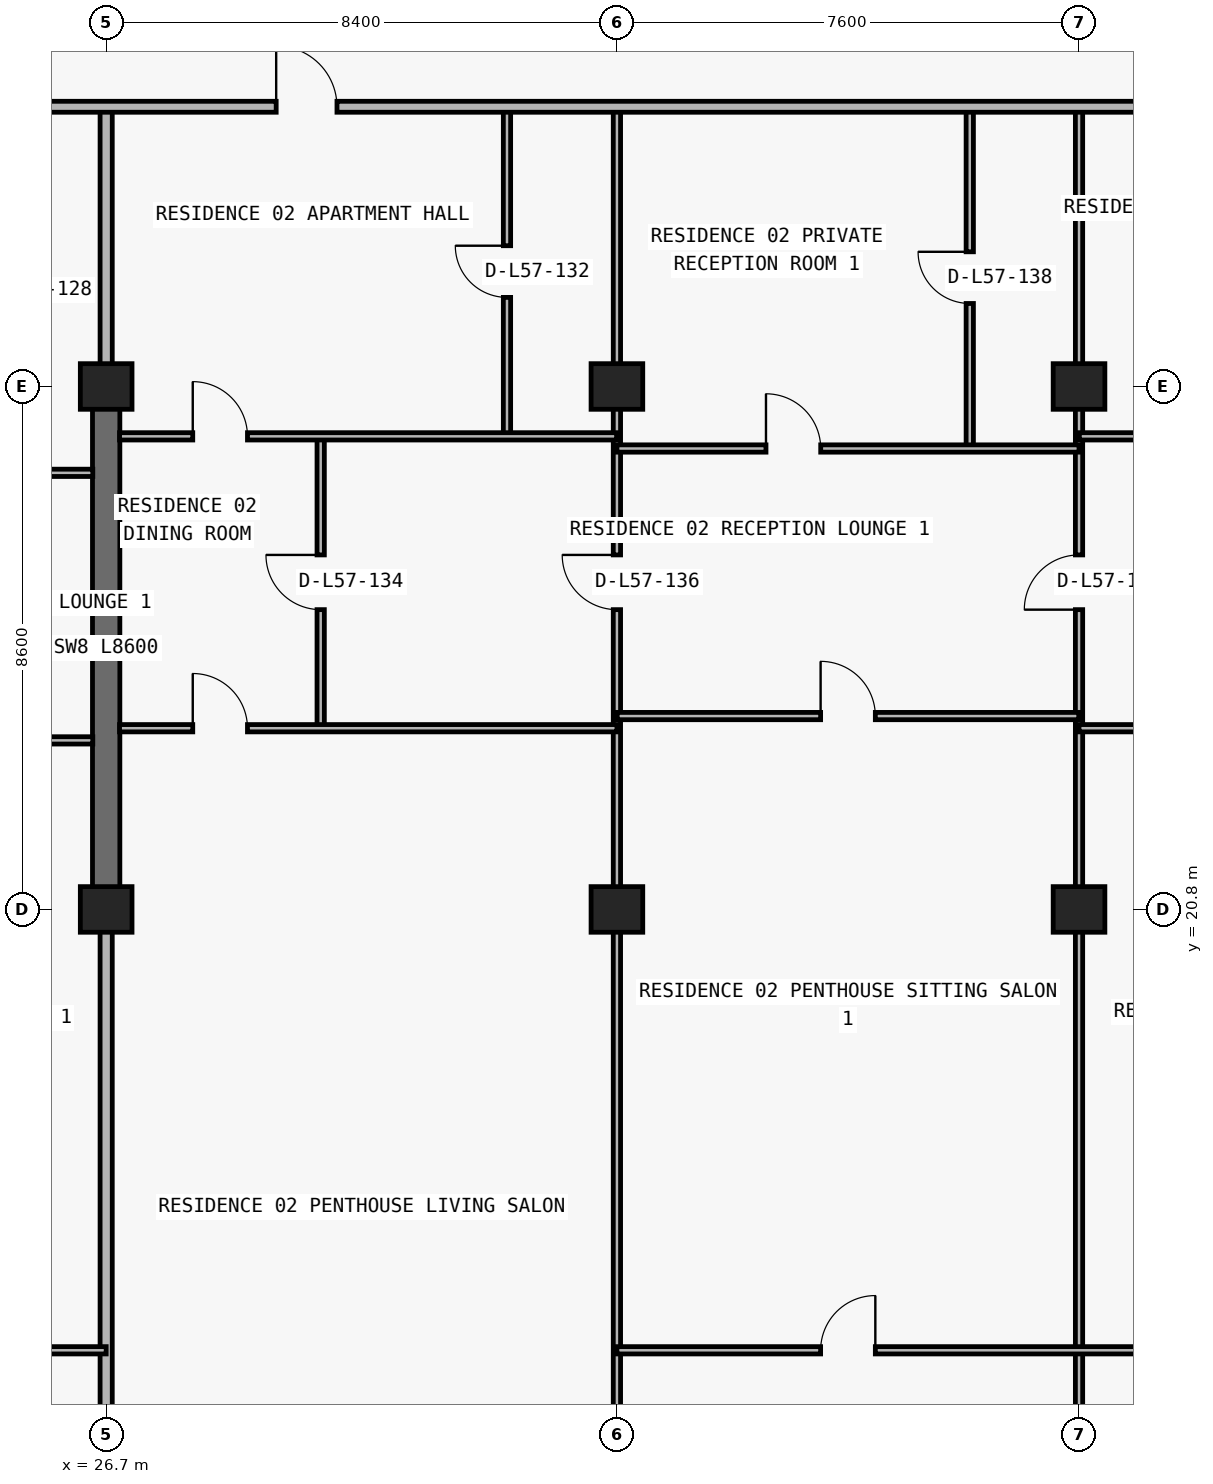
"""IFC4 building model, lengths in metres.
Left out: names, types, materials, properties, quantities, classifications, styles, units other than length and angle.
Written with IfcOpenShell. Run it as: python <this file> out.ifc"""

import sys

from ifc_helpers import new_model, si_unit, direction, frame, frame_2d, origin, origin_2d, place, context, subcontext, project, spatial, rectangle, extrude, element, fill, save


model = new_model("IFC4")
c1 = context("Model", 3, precision=1e-05, world=origin(), true_north=direction((0.0, 1.0)))
c2 = subcontext(c1, "Body", "Model", "MODEL_VIEW")
j1 = project(units=[si_unit("LENGTHUNIT", "METRE"), si_unit("PLANEANGLEUNIT", "RADIAN")], contexts=[c1])
p1 = place(None, origin())
s1 = spatial("IfcSite", under=j1, at=p1, CompositionType="ELEMENT")
p2 = place(p1, origin())
s2 = spatial("IfcBuilding", under=s1, at=p2, CompositionType="ELEMENT")
p3 = place(p2, frame((0.0, 0.0, 204.9)))
s3 = spatial("IfcBuildingStorey", under=s2, at=p3, CompositionType="ELEMENT", Elevation=204.9)
for number, where, z_axis, x_axis in (
    (1, (26.7, 20.8, 0.0), (0.0, 0.0, 1.0), (1.0, 0.0, 0.0)),
    (2, (35.1, 20.8, 0.0), (0.0, 0.0, 1.0), (1.0, 0.0, 0.0)),
    (3, (42.7, 20.8, 0.0), (0.0, 0.0, 1.0), (1.0, 0.0, 0.0)),
    (4, (26.7, 29.4, 0.0), (0.0, 0.0, 1.0), (1.0, 0.0, 0.0)),
    (5, (35.1, 29.4, 0.0), (0.0, 0.0, 1.0), (1.0, 0.0, 0.0)),
    (6, (42.7, 29.4, 0.0), (0.0, 0.0, 1.0), (1.0, 0.0, 0.0)),
):
    element("IfcColumn", number, at=place(p3, frame(where, z_axis=z_axis, x_axis=x_axis)), inside=s3, PredefinedType="COLUMN", context=c2, shape_type="SweptSolid", body=[
        extrude(rectangle(XDim=0.85, YDim=0.75, at=origin_2d()), origin(), (0.0, 0.0, 1.0), 3.05),
    ])
p4 = place(p3, frame((26.7, 20.8, 0.0), z_axis=(0.0, 0.0, 1.0), x_axis=(0.0, 1.0, 0.0)))
e7 = element("IfcWall", 7, at=p4, inside=s3, PredefinedType="SHEAR", context=c2, shape_type="SweptSolid", body=[
    extrude(rectangle(XDim=8.6, YDim=0.45, at=frame_2d((4.3, 0.0))), origin(), (0.0, 0.0, 1.0), 3.05),
])
p5 = place(p3, frame((26.7, 11.24, 0.0), z_axis=(0.0, 0.0, 1.0), x_axis=(0.0, 1.0, 0.0)))
e8 = element("IfcWall", 8, at=p5, inside=s3, PredefinedType="PARTITIONING", context=c2, shape_type="SweptSolid", body=[
    extrude(rectangle(XDim=9.555, YDim=0.2, at=frame_2d((4.777, 0.0))), origin(), (0.0, 0.0, 1.0), 2.263),
])
p6 = place(p3, frame((26.7, 29.405, 0.0), z_axis=(0.0, 0.0, 1.0), x_axis=(0.0, 1.0, 0.0)))
e9 = element("IfcWall", 9, at=p6, inside=s3, PredefinedType="PARTITIONING", context=c2, shape_type="SweptSolid", body=[
    extrude(rectangle(XDim=4.595, YDim=0.2, at=frame_2d((2.297, 0.0))), origin(), (0.0, 0.0, 1.0), 2.335),
])
p7 = place(p3, frame((30.228, 23.78, 0.0), z_axis=(0.0, 0.0, 1.0), x_axis=(0.0, 1.0, 0.0)))
e10 = element("IfcWall", 10, at=p7, inside=s3, PredefinedType="PARTITIONING", context=c2, shape_type="SweptSolid", body=[
    extrude(rectangle(XDim=4.8, YDim=0.12, at=frame_2d((2.4, 0.0))), origin(), (0.0, 0.0, 1.0), 3.05),
])
p8 = place(p7, frame((1.95, 0.0, 0.0)))
e11 = element("IfcOpeningElement", 11, at=p8, cuts=e10, PredefinedType="OPENING", context=c2, shape_type="SweptSolid", body=[
    extrude(rectangle(XDim=0.9, YDim=2.15, at=frame_2d((0.45, 1.075))), frame((0.0, 0.07, 0.0), z_axis=(0.0, -1.0, 0.0), x_axis=(1.0, 0.0, 0.0)), (0.0, 0.0, 1.0), 0.14),
])
p9 = place(p3, frame((33.292, 28.58, 0.0), z_axis=(0.0, 0.0, 1.0), x_axis=(0.0, 1.0, 0.0)))
e12 = element("IfcWall", 12, at=p9, inside=s3, PredefinedType="PARTITIONING", context=c2, shape_type="SweptSolid", body=[
    extrude(rectangle(XDim=5.42, YDim=0.12, at=frame_2d((2.71, 0.0))), origin(), (0.0, 0.0, 1.0), 2.725),
])
p10 = place(p9, frame((2.285, 0.0, 0.0)))
e13 = element("IfcOpeningElement", 13, at=p10, cuts=e12, PredefinedType="OPENING", context=c2, shape_type="SweptSolid", body=[
    extrude(rectangle(XDim=0.85, YDim=2.1, at=frame_2d((0.425, 1.05))), frame((0.0, 0.07, 0.0), z_axis=(0.0, -1.0, 0.0), x_axis=(1.0, 0.0, 0.0)), (0.0, 0.0, 1.0), 0.14),
])
p11 = place(p3, frame((35.1, 11.24, 0.0), z_axis=(0.0, 0.0, 1.0), x_axis=(0.0, 1.0, 0.0)))
e14 = element("IfcWall", 14, at=p11, inside=s3, PredefinedType="PARTITIONING", context=c2, shape_type="SweptSolid", body=[
    extrude(rectangle(XDim=22.76, YDim=0.12, at=frame_2d((11.38, 0.0))), origin(), (0.0, 0.0, 1.0), 2.263),
])
p12 = place(p11, frame((14.49, 0.0, 0.0)))
e15 = element("IfcOpeningElement", 15, at=p12, cuts=e14, PredefinedType="OPENING", context=c2, shape_type="SweptSolid", body=[
    extrude(rectangle(XDim=0.9, YDim=2.15, at=frame_2d((0.45, 1.075))), frame((0.0, 0.07, 0.0), z_axis=(0.0, -1.0, 0.0), x_axis=(1.0, 0.0, 0.0)), (0.0, 0.0, 1.0), 0.14),
])
p13 = place(p3, frame((40.903, 28.38, 0.0), z_axis=(0.0, 0.0, 1.0), x_axis=(0.0, 1.0, 0.0)))
e16 = element("IfcWall", 16, at=p13, inside=s3, PredefinedType="PARTITIONING", context=c2, shape_type="SweptSolid", body=[
    extrude(rectangle(XDim=5.62, YDim=0.12, at=frame_2d((2.81, 0.0))), origin(), (0.0, 0.0, 1.0), 2.725),
])
p14 = place(p13, frame((2.385, 0.0, 0.0)))
e17 = element("IfcOpeningElement", 17, at=p14, cuts=e16, PredefinedType="OPENING", context=c2, shape_type="SweptSolid", body=[
    extrude(rectangle(XDim=0.85, YDim=2.1, at=frame_2d((0.425, 1.05))), frame((0.0, 0.07, 0.0), z_axis=(0.0, -1.0, 0.0), x_axis=(1.0, 0.0, 0.0)), (0.0, 0.0, 1.0), 0.14),
])
p15 = place(p3, frame((42.7, 11.24, 0.0), z_axis=(0.0, 0.0, 1.0), x_axis=(0.0, 1.0, 0.0)))
e18 = element("IfcWall", 18, at=p15, inside=s3, PredefinedType="PARTITIONING", context=c2, shape_type="SweptSolid", body=[
    extrude(rectangle(XDim=22.76, YDim=0.12, at=frame_2d((11.38, 0.0))), origin(), (0.0, 0.0, 1.0), 2.263),
])
p16 = place(p15, frame((14.49, 0.0, 0.0)))
e19 = element("IfcOpeningElement", 19, at=p16, cuts=e18, PredefinedType="OPENING", context=c2, shape_type="SweptSolid", body=[
    extrude(rectangle(XDim=0.9, YDim=2.15, at=frame_2d((0.45, 1.075))), frame((0.0, 0.07, 0.0), z_axis=(0.0, -1.0, 0.0), x_axis=(1.0, 0.0, 0.0)), (0.0, 0.0, 1.0), 0.14),
])
p17 = place(p3, frame((18.3, 13.55, 0.0), z_axis=(0.0, 0.0, 1.0), x_axis=(1.0, 0.0, 0.0)))
e20 = element("IfcWall", 20, at=p17, inside=s3, PredefinedType="PARTITIONING", context=c2, shape_type="SweptSolid", body=[
    extrude(rectangle(XDim=8.4, YDim=0.12, at=frame_2d((4.2, 0.0))), origin(), (0.0, 0.0, 1.0), 3.05),
])
p18 = place(p17, frame((3.75, 0.0, 0.0)))
e21 = element("IfcOpeningElement", 21, at=p18, cuts=e20, PredefinedType="OPENING", context=c2, shape_type="SweptSolid", body=[
    extrude(rectangle(XDim=0.9, YDim=2.15, at=frame_2d((0.45, 1.075))), frame((0.0, 0.07, 0.0), z_axis=(0.0, -1.0, 0.0), x_axis=(1.0, 0.0, 0.0)), (0.0, 0.0, 1.0), 0.14),
])
p19 = place(p3, frame((35.1, 13.55, 0.0), z_axis=(0.0, 0.0, 1.0), x_axis=(1.0, 0.0, 0.0)))
e22 = element("IfcWall", 22, at=p19, inside=s3, PredefinedType="PARTITIONING", context=c2, shape_type="SweptSolid", body=[
    extrude(rectangle(XDim=16.0, YDim=0.12, at=frame_2d((8.0, 0.0))), origin(), (0.0, 0.0, 1.0), 3.05),
])
p20 = place(p19, frame((3.35, 0.0, 0.0)))
e23 = element("IfcOpeningElement", 23, at=p20, cuts=e22, PredefinedType="OPENING", context=c2, shape_type="SweptSolid", body=[
    extrude(rectangle(XDim=0.9, YDim=2.15, at=frame_2d((0.45, 1.075))), frame((0.0, 0.07, 0.0), z_axis=(0.0, -1.0, 0.0), x_axis=(1.0, 0.0, 0.0)), (0.0, 0.0, 1.0), 0.14),
])
p21 = place(p19, frame((11.35, 0.0, 0.0)))
e24 = element("IfcOpeningElement", 24, at=p21, cuts=e22, PredefinedType="OPENING", context=c2, shape_type="SweptSolid", body=[
    extrude(rectangle(XDim=0.9, YDim=2.15, at=frame_2d((0.45, 1.075))), frame((0.0, 0.07, 0.0), z_axis=(0.0, -1.0, 0.0), x_axis=(1.0, 0.0, 0.0)), (0.0, 0.0, 1.0), 0.14),
])
p22 = place(p3, frame((18.305, 23.58, 0.0), z_axis=(0.0, 0.0, 1.0), x_axis=(1.0, 0.0, 0.0)))
e25 = element("IfcWall", 25, at=p22, inside=s3, PredefinedType="PARTITIONING", context=c2, shape_type="SweptSolid", body=[
    extrude(rectangle(XDim=8.175, YDim=0.12, at=frame_2d((4.087, 0.0))), origin(), (0.0, 0.0, 1.0), 3.05),
])
p23 = place(p22, frame((3.637, 0.0, 0.0)))
e26 = element("IfcOpeningElement", 26, at=p23, cuts=e25, PredefinedType="OPENING", context=c2, shape_type="SweptSolid", body=[
    extrude(rectangle(XDim=0.9, YDim=2.15, at=frame_2d((0.45, 1.075))), frame((0.0, 0.07, 0.0), z_axis=(0.0, -1.0, 0.0), x_axis=(1.0, 0.0, 0.0)), (0.0, 0.0, 1.0), 0.14),
])
p24 = place(p3, frame((26.92, 23.78, 0.0), z_axis=(0.0, 0.0, 1.0), x_axis=(1.0, 0.0, 0.0)))
e27 = element("IfcWall", 27, at=p24, inside=s3, PredefinedType="PARTITIONING", context=c2, shape_type="SweptSolid", body=[
    extrude(rectangle(XDim=8.18, YDim=0.12, at=frame_2d((4.09, 0.0))), origin(), (0.0, 0.0, 1.0), 3.05),
])
p25 = place(p24, frame((1.204, 0.0, 0.0)))
e28 = element("IfcOpeningElement", 28, at=p25, cuts=e27, PredefinedType="OPENING", context=c2, shape_type="SweptSolid", body=[
    extrude(rectangle(XDim=0.9, YDim=2.15, at=frame_2d((0.45, 1.075))), frame((0.0, 0.07, 0.0), z_axis=(0.0, -1.0, 0.0), x_axis=(1.0, 0.0, 0.0)), (0.0, 0.0, 1.0), 0.14),
])
p26 = place(p3, frame((42.7, 23.78, 0.0), z_axis=(0.0, 0.0, 1.0), x_axis=(1.0, 0.0, 0.0)))
e29 = element("IfcWall", 29, at=p26, inside=s3, PredefinedType="PARTITIONING", context=c2, shape_type="SweptSolid", body=[
    extrude(rectangle(XDim=8.18, YDim=0.12, at=frame_2d((4.09, 0.0))), origin(), (0.0, 0.0, 1.0), 3.05),
])
p27 = place(p26, frame((3.64, 0.0, 0.0)))
e30 = element("IfcOpeningElement", 30, at=p27, cuts=e29, PredefinedType="OPENING", context=c2, shape_type="SweptSolid", body=[
    extrude(rectangle(XDim=0.9, YDim=2.15, at=frame_2d((0.45, 1.075))), frame((0.0, 0.07, 0.0), z_axis=(0.0, -1.0, 0.0), x_axis=(1.0, 0.0, 0.0)), (0.0, 0.0, 1.0), 0.14),
])
p28 = place(p3, frame((35.105, 23.98, 0.0), z_axis=(0.0, 0.0, 1.0), x_axis=(1.0, 0.0, 0.0)))
e31 = element("IfcWall", 31, at=p28, inside=s3, PredefinedType="PARTITIONING", context=c2, shape_type="SweptSolid", body=[
    extrude(rectangle(XDim=7.59, YDim=0.12, at=frame_2d((3.795, 0.0))), origin(), (0.0, 0.0, 1.0), 3.05),
])
p29 = place(p28, frame((3.345, 0.0, 0.0)))
e32 = element("IfcOpeningElement", 32, at=p29, cuts=e31, PredefinedType="OPENING", context=c2, shape_type="SweptSolid", body=[
    extrude(rectangle(XDim=0.9, YDim=2.15, at=frame_2d((0.45, 1.075))), frame((0.0, 0.07, 0.0), z_axis=(0.0, -1.0, 0.0), x_axis=(1.0, 0.0, 0.0)), (0.0, 0.0, 1.0), 0.14),
])
p30 = place(p3, frame((18.3, 27.98, 0.0), z_axis=(0.0, 0.0, 1.0), x_axis=(1.0, 0.0, 0.0)))
e33 = element("IfcWall", 33, at=p30, inside=s3, PredefinedType="PARTITIONING", context=c2, shape_type="SweptSolid", body=[
    extrude(rectangle(XDim=8.18, YDim=0.12, at=frame_2d((4.09, 0.0))), origin(), (0.0, 0.0, 1.0), 3.05),
])
p31 = place(p30, frame((2.952, 0.0, 0.0)))
e34 = element("IfcOpeningElement", 34, at=p31, cuts=e33, PredefinedType="OPENING", context=c2, shape_type="SweptSolid", body=[
    extrude(rectangle(XDim=0.9, YDim=2.15, at=frame_2d((0.45, 1.075))), frame((0.0, 0.07, 0.0), z_axis=(0.0, -1.0, 0.0), x_axis=(1.0, 0.0, 0.0)), (0.0, 0.0, 1.0), 0.14),
])
p32 = place(p3, frame((35.1, 28.38, 0.0), z_axis=(0.0, 0.0, 1.0), x_axis=(1.0, 0.0, 0.0)))
e35 = element("IfcWall", 35, at=p32, inside=s3, PredefinedType="PARTITIONING", context=c2, shape_type="SweptSolid", body=[
    extrude(rectangle(XDim=7.6, YDim=0.12, at=frame_2d((3.8, 0.0))), origin(), (0.0, 0.0, 1.0), 3.05),
])
p33 = place(p32, frame((2.451, 0.0, 0.0)))
e36 = element("IfcOpeningElement", 36, at=p33, cuts=e35, PredefinedType="OPENING", context=c2, shape_type="SweptSolid", body=[
    extrude(rectangle(XDim=0.9, YDim=2.15, at=frame_2d((0.45, 1.075))), frame((0.0, 0.07, 0.0), z_axis=(0.0, -1.0, 0.0), x_axis=(1.0, 0.0, 0.0)), (0.0, 0.0, 1.0), 0.14),
])
p34 = place(p3, frame((26.92, 28.58, 0.0), z_axis=(0.0, 0.0, 1.0), x_axis=(1.0, 0.0, 0.0)))
e37 = element("IfcWall", 37, at=p34, inside=s3, PredefinedType="PARTITIONING", context=c2, shape_type="SweptSolid", body=[
    extrude(rectangle(XDim=8.175, YDim=0.12, at=frame_2d((4.087, 0.0))), origin(), (0.0, 0.0, 1.0), 3.05),
])
p35 = place(p34, frame((1.204, 0.0, 0.0)))
e38 = element("IfcOpeningElement", 38, at=p35, cuts=e37, PredefinedType="OPENING", context=c2, shape_type="SweptSolid", body=[
    extrude(rectangle(XDim=0.9, YDim=2.15, at=frame_2d((0.45, 1.075))), frame((0.0, 0.07, 0.0), z_axis=(0.0, -1.0, 0.0), x_axis=(1.0, 0.0, 0.0)), (0.0, 0.0, 1.0), 0.14),
])
p36 = place(p3, frame((42.705, 28.58, 0.0), z_axis=(0.0, 0.0, 1.0), x_axis=(1.0, 0.0, 0.0)))
e39 = element("IfcWall", 39, at=p36, inside=s3, PredefinedType="PARTITIONING", context=c2, shape_type="SweptSolid", body=[
    extrude(rectangle(XDim=8.175, YDim=0.12, at=frame_2d((4.087, 0.0))), origin(), (0.0, 0.0, 1.0), 3.05),
])
p37 = place(p36, frame((2.862, 0.0, 0.0)))
e40 = element("IfcOpeningElement", 40, at=p37, cuts=e39, PredefinedType="OPENING", context=c2, shape_type="SweptSolid", body=[
    extrude(rectangle(XDim=0.9, YDim=2.15, at=frame_2d((0.45, 1.075))), frame((0.0, 0.07, 0.0), z_axis=(0.0, -1.0, 0.0), x_axis=(1.0, 0.0, 0.0)), (0.0, 0.0, 1.0), 0.14),
])
p38 = place(p3, frame((10.105, 34.0, 0.0), z_axis=(0.0, 0.0, 1.0), x_axis=(1.0, 0.0, 0.0)))
e41 = element("IfcWall", 41, at=p38, inside=s3, PredefinedType="PARTITIONING", context=c2, shape_type="SweptSolid", body=[
    extrude(rectangle(XDim=57.595, YDim=0.18, at=frame_2d((28.797, 0.0))), origin(), (0.0, 0.0, 1.0), 3.05),
])
p39 = place(p38, frame((2.712, 0.0, 0.0)))
e42 = element("IfcOpeningElement", 42, at=p39, cuts=e41, PredefinedType="OPENING", context=c2, shape_type="SweptSolid", body=[
    extrude(rectangle(XDim=1.0, YDim=2.2, at=frame_2d((0.5, 1.1))), frame((0.0, 0.1, 0.0), z_axis=(0.0, -1.0, 0.0), x_axis=(1.0, 0.0, 0.0)), (0.0, 0.0, 1.0), 0.2),
])
p40 = place(p38, frame((19.391, 0.0, 0.0)))
e43 = element("IfcOpeningElement", 43, at=p40, cuts=e41, PredefinedType="OPENING", context=c2, shape_type="SweptSolid", body=[
    extrude(rectangle(XDim=1.0, YDim=2.2, at=frame_2d((0.5, 1.1))), frame((0.0, 0.1, 0.0), z_axis=(0.0, -1.0, 0.0), x_axis=(1.0, 0.0, 0.0)), (0.0, 0.0, 1.0), 0.2),
])
p41 = place(p38, frame((43.794, 0.0, 0.0)))
e44 = element("IfcOpeningElement", 44, at=p41, cuts=e41, PredefinedType="OPENING", context=c2, shape_type="SweptSolid", body=[
    extrude(rectangle(XDim=1.0, YDim=2.2, at=frame_2d((0.5, 1.1))), frame((0.0, 0.1, 0.0), z_axis=(0.0, -1.0, 0.0), x_axis=(1.0, 0.0, 0.0)), (0.0, 0.0, 1.0), 0.2),
])
p42 = place(p40, origin())
e45 = element("IfcDoor", 45, at=p42, inside=s3, OperationType="SINGLE_SWING_LEFT", PredefinedType="DOOR", context=c2, shape_type="SweptSolid", body=[
    extrude(rectangle(XDim=1.0, YDim=2.2, at=frame_2d((0.5, 1.1))), frame((0.0, 0.025, 0.0), z_axis=(0.0, -1.0, 0.0), x_axis=(1.0, 0.0, 0.0)), (0.0, 0.0, 1.0), 0.05),
])
fill(e43, e45)
p43 = place(p10, origin())
e46 = element("IfcDoor", 46, at=p43, inside=s3, OperationType="SINGLE_SWING_RIGHT", PredefinedType="DOOR", context=c2, shape_type="SweptSolid", body=[
    extrude(rectangle(XDim=0.85, YDim=2.1, at=frame_2d((0.425, 1.05))), frame((0.0, 0.025, 0.0), z_axis=(0.0, -1.0, 0.0), x_axis=(1.0, 0.0, 0.0)), (0.0, 0.0, 1.0), 0.05),
])
fill(e13, e46)
p44 = place(p35, origin())
e47 = element("IfcDoor", 47, at=p44, inside=s3, OperationType="SINGLE_SWING_LEFT", PredefinedType="DOOR", context=c2, shape_type="SweptSolid", body=[
    extrude(rectangle(XDim=0.9, YDim=2.15, at=frame_2d((0.45, 1.075))), frame((0.0, 0.025, 0.0), z_axis=(0.0, -1.0, 0.0), x_axis=(1.0, 0.0, 0.0)), (0.0, 0.0, 1.0), 0.05),
])
fill(e38, e47)
p45 = place(p8, origin())
e48 = element("IfcDoor", 48, at=p45, inside=s3, OperationType="SINGLE_SWING_RIGHT", PredefinedType="DOOR", context=c2, shape_type="SweptSolid", body=[
    extrude(rectangle(XDim=0.9, YDim=2.15, at=frame_2d((0.45, 1.075))), frame((0.0, 0.025, 0.0), z_axis=(0.0, -1.0, 0.0), x_axis=(1.0, 0.0, 0.0)), (0.0, 0.0, 1.0), 0.05),
])
fill(e11, e48)
p46 = place(p25, origin())
e49 = element("IfcDoor", 49, at=p46, inside=s3, OperationType="SINGLE_SWING_LEFT", PredefinedType="DOOR", context=c2, shape_type="SweptSolid", body=[
    extrude(rectangle(XDim=0.9, YDim=2.15, at=frame_2d((0.45, 1.075))), frame((0.0, 0.025, 0.0), z_axis=(0.0, -1.0, 0.0), x_axis=(1.0, 0.0, 0.0)), (0.0, 0.0, 1.0), 0.05),
])
fill(e28, e49)
p47 = place(p12, origin())
e50 = element("IfcDoor", 50, at=p47, inside=s3, OperationType="SINGLE_SWING_RIGHT", PredefinedType="DOOR", context=c2, shape_type="SweptSolid", body=[
    extrude(rectangle(XDim=0.9, YDim=2.15, at=frame_2d((0.45, 1.075))), frame((0.0, 0.025, 0.0), z_axis=(0.0, -1.0, 0.0), x_axis=(1.0, 0.0, 0.0)), (0.0, 0.0, 1.0), 0.05),
])
fill(e15, e50)
p48 = place(p33, origin())
e51 = element("IfcDoor", 51, at=p48, inside=s3, OperationType="SINGLE_SWING_LEFT", PredefinedType="DOOR", context=c2, shape_type="SweptSolid", body=[
    extrude(rectangle(XDim=0.9, YDim=2.15, at=frame_2d((0.45, 1.075))), frame((0.0, 0.025, 0.0), z_axis=(0.0, -1.0, 0.0), x_axis=(1.0, 0.0, 0.0)), (0.0, 0.0, 1.0), 0.05),
])
fill(e36, e51)
p49 = place(p14, origin())
e52 = element("IfcDoor", 52, at=p49, inside=s3, OperationType="SINGLE_SWING_RIGHT", PredefinedType="DOOR", context=c2, shape_type="SweptSolid", body=[
    extrude(rectangle(XDim=0.85, YDim=2.1, at=frame_2d((0.425, 1.05))), frame((0.0, 0.025, 0.0), z_axis=(0.0, -1.0, 0.0), x_axis=(1.0, 0.0, 0.0)), (0.0, 0.0, 1.0), 0.05),
])
fill(e17, e52)
p50 = place(p29, origin())
e53 = element("IfcDoor", 53, at=p50, inside=s3, OperationType="SINGLE_SWING_LEFT", PredefinedType="DOOR", context=c2, shape_type="SweptSolid", body=[
    extrude(rectangle(XDim=0.9, YDim=2.15, at=frame_2d((0.45, 1.075))), frame((0.0, 0.025, 0.0), z_axis=(0.0, -1.0, 0.0), x_axis=(1.0, 0.0, 0.0)), (0.0, 0.0, 1.0), 0.05),
])
fill(e32, e53)
p51 = place(p20, origin())
e54 = element("IfcDoor", 54, at=p51, inside=s3, OperationType="SINGLE_SWING_RIGHT", PredefinedType="DOOR", context=c2, shape_type="SweptSolid", body=[
    extrude(rectangle(XDim=0.9, YDim=2.15, at=frame_2d((0.45, 1.075))), frame((0.0, 0.025, 0.0), z_axis=(0.0, -1.0, 0.0), x_axis=(1.0, 0.0, 0.0)), (0.0, 0.0, 1.0), 0.05),
])
fill(e23, e54)
p52 = place(p16, origin())
e55 = element("IfcDoor", 55, at=p52, inside=s3, OperationType="SINGLE_SWING_LEFT", PredefinedType="DOOR", context=c2, shape_type="SweptSolid", body=[
    extrude(rectangle(XDim=0.9, YDim=2.15, at=frame_2d((0.45, 1.075))), frame((0.0, 0.025, 0.0), z_axis=(0.0, -1.0, 0.0), x_axis=(1.0, 0.0, 0.0)), (0.0, 0.0, 1.0), 0.05),
])
fill(e19, e55)
save(model, sys.argv[1])
